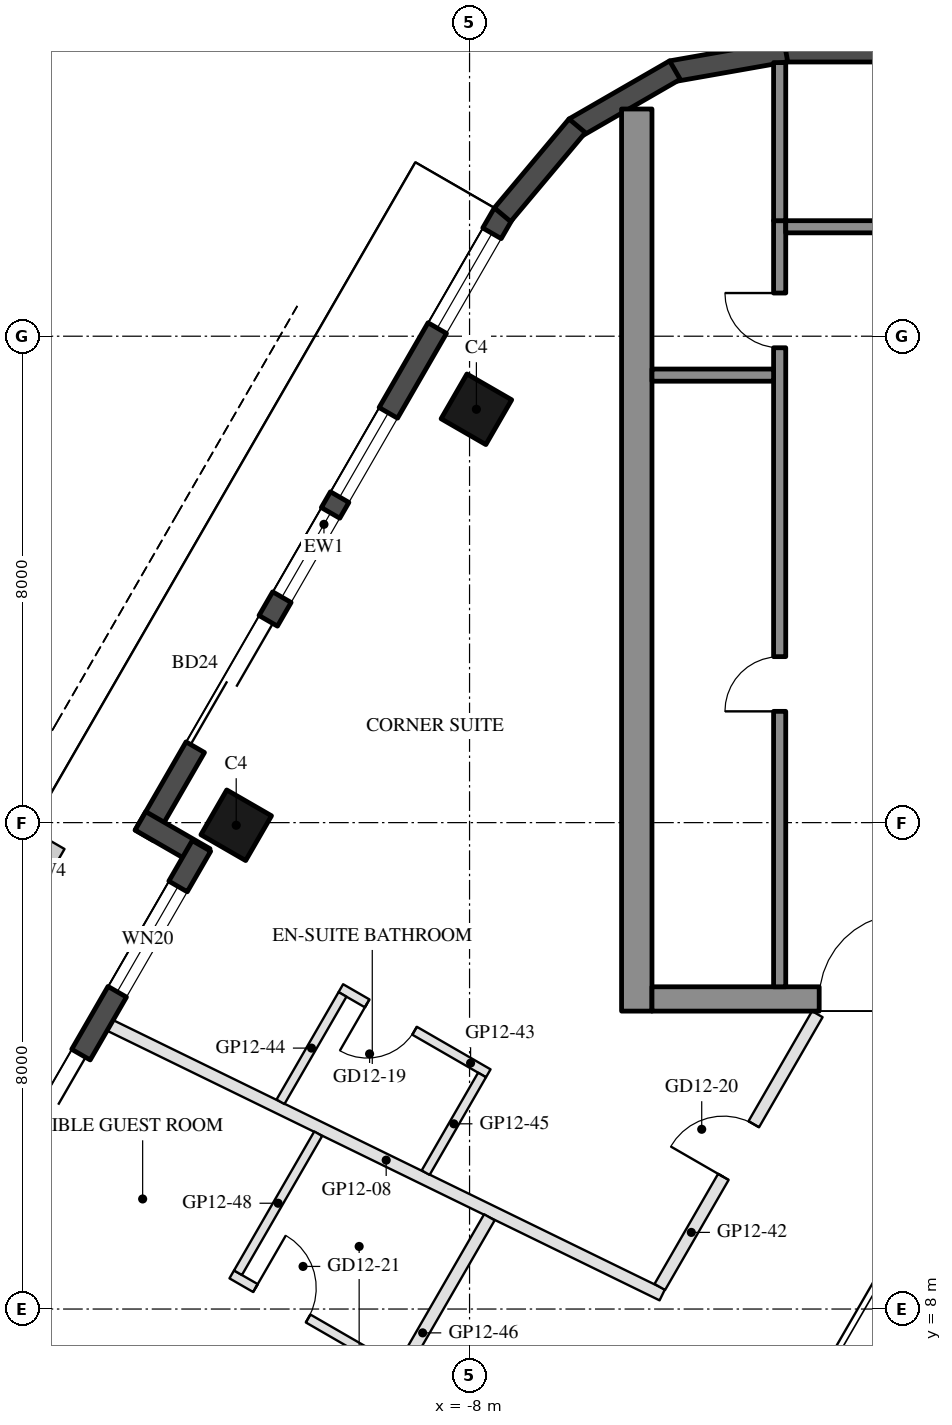
"""IFC4 building model, lengths in metres.
Left out: names, types, materials, properties, quantities, classifications, styles, units other than length and angle.
Written with IfcOpenShell. Run it as: python <this file> out.ifc"""

import sys

from ifc_helpers import new_model, si_unit, direction, frame, frame_2d, origin, origin_2d, place, context, subcontext, project, spatial, rectangle, hollow_rectangle, extrude, element, fill, save


model = new_model("IFC4")
c1 = context("Model", 3, precision=1e-05, world=origin(), true_north=direction((0.0, 1.0)))
c2 = subcontext(c1, "Body", "Model", "MODEL_VIEW")
j1 = project(units=[si_unit("LENGTHUNIT", "METRE"), si_unit("PLANEANGLEUNIT", "RADIAN")], contexts=[c1])
p1 = place(None, origin())
s1 = spatial("IfcSite", under=j1, at=p1, CompositionType="ELEMENT")
p2 = place(p1, origin())
s2 = spatial("IfcBuilding", under=s1, at=p2, CompositionType="ELEMENT")
p3 = place(p2, frame((0.0, 0.0, 150.3)))
s3 = spatial("IfcBuildingStorey", under=s2, at=p3, CompositionType="ELEMENT", Elevation=150.3)
for number, where, z_axis, x_axis in (
    (1, (-7.888, 22.798, 0.0), (0.0, 0.0, 1.0), (0.5, 0.866, 0.0)),
    (2, (-11.838, 15.957, 0.0), (0.0, 0.0, 1.0), (0.5, 0.866, 0.0)),
):
    element("IfcColumn", number, at=place(p3, frame(where, z_axis=z_axis, x_axis=x_axis)), inside=s3, PredefinedType="COLUMN", context=c2, shape_type="SweptSolid", body=[
        extrude(hollow_rectangle(XDim=0.85, YDim=0.85, WallThickness=0.04, at=origin_2d()), origin(), (0.0, 0.0, 1.0), 3.7),
    ])
p4 = place(p3, frame((-7.441, 26.022, 0.0), z_axis=(0.0, 0.0, 1.0), x_axis=(-0.499992533062, -0.86602971478, 0.0)))
e3 = element("IfcWall", 3, at=p4, inside=s3, PredefinedType="SOLIDWALL", context=c2, shape_type="SweptSolid", body=[
    extrude(rectangle(XDim=11.816, YDim=0.35, at=frame_2d((5.908, 0.0))), origin(), (0.0, 0.0, 1.0), 3.55),
])
p5 = place(p4, frame((0.381, 0.0, 0.3)))
e4 = element("IfcOpeningElement", 4, at=p5, cuts=e3, PredefinedType="OPENING", context=c2, shape_type="SweptSolid", body=[
    extrude(rectangle(XDim=1.8, YDim=2.65, at=frame_2d((0.9, 1.325))), frame((0.0, 0.185, 0.0), z_axis=(0.0, -1.0, 0.0), x_axis=(1.0, 0.0, 0.0)), (0.0, 0.0, 1.0), 0.37),
])
p6 = place(p4, frame((7.74, 0.0, 0.0)))
e5 = element("IfcOpeningElement", 5, at=p6, cuts=e3, PredefinedType="OPENING", context=c2, shape_type="SweptSolid", body=[
    extrude(rectangle(XDim=2.4, YDim=2.4, at=frame_2d((1.2, 1.2))), frame((0.0, 0.185, 0.0), z_axis=(0.0, -1.0, 0.0), x_axis=(1.0, 0.0, 0.0)), (0.0, 0.0, 1.0), 0.37),
])
p7 = place(p4, frame((3.791, 0.0, 0.3)))
e6 = element("IfcOpeningElement", 6, at=p7, cuts=e3, PredefinedType="OPENING", context=c2, shape_type="SweptSolid", body=[
    extrude(rectangle(XDim=1.6, YDim=2.65, at=frame_2d((0.8, 1.325))), frame((0.0, 0.185, 0.0), z_axis=(0.0, -1.0, 0.0), x_axis=(1.0, 0.0, 0.0)), (0.0, 0.0, 1.0), 0.37),
])
p8 = place(p4, frame((5.691, 0.0, 0.3)))
e7 = element("IfcOpeningElement", 7, at=p8, cuts=e3, PredefinedType="OPENING", context=c2, shape_type="SweptSolid", body=[
    extrude(rectangle(XDim=1.6, YDim=2.65, at=frame_2d((0.8, 1.325))), frame((0.0, 0.185, 0.0), z_axis=(0.0, -1.0, 0.0), x_axis=(1.0, 0.0, 0.0)), (0.0, 0.0, 1.0), 0.37),
])
p9 = place(p3, frame((-13.413, 16.029, 0.0), z_axis=(0.0, 0.0, 1.0), x_axis=(0.866005645448, -0.500034220881, 0.0)))
e8 = element("IfcWall", 8, at=p9, inside=s3, PredefinedType="SOLIDWALL", context=c2, shape_type="SweptSolid", body=[
    extrude(rectangle(XDim=1.22, YDim=0.35, at=frame_2d((0.61, 0.0))), origin(), (0.0, 0.0, 1.0), 3.55),
])
p10 = place(p3, frame((-12.409, 15.617, 0.0), z_axis=(0.0, 0.0, 1.0), x_axis=(-0.500003597184, -0.866023326939, 0.0)))
e9 = element("IfcWall", 9, at=p10, inside=s3, PredefinedType="SOLIDWALL", context=c2, shape_type="SweptSolid", body=[
    extrude(rectangle(XDim=6.74, YDim=0.35, at=frame_2d((3.37, 0.0))), origin(), (0.0, 0.0, 1.0), 3.55),
])
p11 = place(p10, frame((0.77, 0.0, 0.3)))
e10 = element("IfcOpeningElement", 10, at=p11, cuts=e9, PredefinedType="OPENING", context=c2, shape_type="SweptSolid", body=[
    extrude(rectangle(XDim=2.0, YDim=2.65, at=frame_2d((1.0, 1.325))), frame((0.0, 0.185, 0.0), z_axis=(0.0, -1.0, 0.0), x_axis=(1.0, 0.0, 0.0)), (0.0, 0.0, 1.0), 0.37),
])
p12 = place(p10, frame((3.964, 0.0, 0.0)))
e11 = element("IfcOpeningElement", 11, at=p12, cuts=e9, PredefinedType="OPENING", context=c2, shape_type="SweptSolid", body=[
    extrude(rectangle(XDim=1.8, YDim=2.4, at=frame_2d((0.9, 1.2))), frame((0.0, 0.185, 0.0), z_axis=(0.0, -1.0, 0.0), x_axis=(1.0, 0.0, 0.0)), (0.0, 0.0, 1.0), 0.37),
])
p13 = place(p3, frame((2.829, 28.685, 0.0), z_axis=(0.0, 0.0, 1.0), x_axis=(-1.0, 0.0, 0.0)))
e12 = element("IfcWall", 12, at=p13, inside=s3, PredefinedType="SOLIDWALL", context=c2, shape_type="SweptSolid", body=[
    extrude(rectangle(XDim=5.658, YDim=0.35, at=frame_2d((2.829, 0.0))), origin(), (0.0, 0.0, 1.0), 3.55),
])
for number, where, z_axis, x_axis in (
    (13, (-2.799, 28.688, 0.0), (0.0, 0.0, 1.0), (-0.985, -0.174, 0.0)),
    (14, (-4.623, 28.377, 0.0), (0.0, 0.0, 1.0), (-0.866, -0.5, 0.0)),
):
    element("IfcWall", number, at=place(p3, frame(where, z_axis=z_axis, x_axis=x_axis)), inside=s3, PredefinedType="SOLIDWALL", context=c2, shape_type="SweptSolid", body=[
        extrude(rectangle(XDim=1.91, YDim=0.35, at=frame_2d((0.955, 0.0))), origin(), (0.0, 0.0, 1.0), 3.55),
    ])
p14 = place(p3, frame((-6.23, 27.461, 0.0), z_axis=(0.0, 0.0, 1.0), x_axis=(-0.642808304945, -0.766027077259, 0.0)))
e15 = element("IfcWall", 15, at=p14, inside=s3, PredefinedType="SOLIDWALL", context=c2, shape_type="SweptSolid", body=[
    extrude(rectangle(XDim=1.91, YDim=0.35, at=frame_2d((0.955, 0.0))), origin(), (0.0, 0.0, 1.0), 3.55),
])
p15 = place(p3, frame((-5.25, 12.9, 0.0), z_axis=(0.0, 0.0, 1.0), x_axis=(0.0, 1.0, 0.0)))
e16 = element("IfcWall", 16, at=p15, inside=s3, PredefinedType="SHEAR", context=c2, shape_type="SweptSolid", body=[
    extrude(rectangle(XDim=14.837, YDim=0.5, at=frame_2d((7.418, 0.0))), origin(), (0.0, 0.0, 1.0), 3.5),
])
p16 = place(p3, frame((5.0, 13.1, 0.0), z_axis=(0.0, 0.0, 1.0), x_axis=(-1.0, 0.0, 0.0)))
e17 = element("IfcWall", 17, at=p16, inside=s3, PredefinedType="SHEAR", context=c2, shape_type="SweptSolid", body=[
    extrude(rectangle(XDim=10.0, YDim=0.4, at=frame_2d((5.0, 0.0))), origin(), (0.0, 0.0, 1.0), 3.5),
])
p17 = place(p16, frame((3.55, 0.0, 0.0)))
e18 = element("IfcOpeningElement", 18, at=p17, cuts=e17, PredefinedType="OPENING", context=c2, shape_type="SweptSolid", body=[
    extrude(rectangle(XDim=1.1, YDim=2.1, at=frame_2d((0.55, 1.05))), frame((0.0, 0.21, 0.0), z_axis=(0.0, -1.0, 0.0), x_axis=(1.0, 0.0, 0.0)), (0.0, 0.0, 1.0), 0.42),
])
p18 = place(p16, frame((5.85, 0.0, 0.0)))
e19 = element("IfcOpeningElement", 19, at=p18, cuts=e17, PredefinedType="OPENING", context=c2, shape_type="SweptSolid", body=[
    extrude(rectangle(XDim=1.4, YDim=2.1, at=frame_2d((0.7, 1.05))), frame((0.0, 0.21, 0.0), z_axis=(0.0, -1.0, 0.0), x_axis=(1.0, 0.0, 0.0)), (0.0, 0.0, 1.0), 0.42),
])
p19 = place(p3, frame((-2.9, 13.3, 0.0), z_axis=(0.0, 0.0, 1.0), x_axis=(0.0, 1.0, 0.0)))
e20 = element("IfcWall", 20, at=p19, inside=s3, PredefinedType="SHEAR", context=c2, shape_type="SweptSolid", body=[
    extrude(rectangle(XDim=12.6, YDim=0.2, at=frame_2d((6.3, 0.0))), origin(), (0.0, 0.0, 1.0), 3.5),
])
p20 = place(p19, frame((4.53, 0.0, 0.0)))
e21 = element("IfcOpeningElement", 21, at=p20, cuts=e20, PredefinedType="OPENING", context=c2, shape_type="SweptSolid", body=[
    extrude(rectangle(XDim=0.9, YDim=2.1, at=frame_2d((0.45, 1.05))), frame((0.0, 0.11, 0.0), z_axis=(0.0, -1.0, 0.0), x_axis=(1.0, 0.0, 0.0)), (0.0, 0.0, 1.0), 0.22),
])
p21 = place(p19, frame((10.51, 0.0, 0.0)))
e22 = element("IfcOpeningElement", 22, at=p21, cuts=e20, PredefinedType="OPENING", context=c2, shape_type="SweptSolid", body=[
    extrude(rectangle(XDim=0.9, YDim=2.1, at=frame_2d((0.45, 1.05))), frame((0.0, 0.11, 0.0), z_axis=(0.0, -1.0, 0.0), x_axis=(1.0, 0.0, 0.0)), (0.0, 0.0, 1.0), 0.22),
])
p22 = place(p3, frame((-0.4, 25.8, 0.0), z_axis=(0.0, 0.0, 1.0), x_axis=(-1.0, 0.0, 0.0)))
e23 = element("IfcWall", 23, at=p22, inside=s3, PredefinedType="SHEAR", context=c2, shape_type="SweptSolid", body=[
    extrude(rectangle(XDim=2.4, YDim=0.2, at=frame_2d((1.2, 0.0))), origin(), (0.0, 0.0, 1.0), 3.5),
])
p23 = place(p3, frame((-3.0, 23.36, 0.0), z_axis=(0.0, 0.0, 1.0), x_axis=(-1.0, 0.0, 0.0)))
e24 = element("IfcWall", 24, at=p23, inside=s3, PredefinedType="SHEAR", context=c2, shape_type="SweptSolid", body=[
    extrude(rectangle(XDim=2.0, YDim=0.2, at=frame_2d((1.0, 0.0))), origin(), (0.0, 0.0, 1.0), 3.5),
])
p24 = place(p3, frame((-2.9, 25.9, 0.0), z_axis=(0.0, 0.0, 1.0), x_axis=(0.0, 1.0, 0.0)))
e25 = element("IfcWall", 25, at=p24, inside=s3, PredefinedType="SHEAR", context=c2, shape_type="SweptSolid", body=[
    extrude(rectangle(XDim=2.6, YDim=0.2, at=frame_2d((1.3, 0.0))), origin(), (0.0, 0.0, 1.0), 3.5),
])
p25 = place(p3, frame((-13.911, 12.665, 0.0), z_axis=(0.0, 0.0, 1.0), x_axis=(0.898639294085, -0.438688293811, 0.0)))
e26 = element("IfcWall", 26, at=p25, inside=s3, PredefinedType="PARTITIONING", context=c2, shape_type="SweptSolid", body=[
    extrude(rectangle(XDim=10.104, YDim=0.2, at=frame_2d((5.052, 0.0))), origin(), (0.0, 0.0, 1.0), 2.95),
])
p26 = place(p3, frame((-17.412, 8.402, 0.0), z_axis=(0.0, 0.0, 1.0), x_axis=(0.880917469793, -0.473269913912, 0.0)))
e27 = element("IfcWall", 27, at=p26, inside=s3, PredefinedType="PARTITIONING", context=c2, shape_type="SweptSolid", body=[
    extrude(rectangle(XDim=7.984, YDim=0.2, at=frame_2d((3.992, 0.0))), origin(), (0.0, 0.0, 1.0), 3.06),
])
p27 = place(p3, frame((-4.871, 8.363, 0.0), z_axis=(0.0, 0.0, 1.0), x_axis=(0.500016142392, 0.86601608377, 0.0)))
e28 = element("IfcWall", 28, at=p27, inside=s3, PredefinedType="PARTITIONING", context=c2, shape_type="SweptSolid", body=[
    extrude(rectangle(XDim=5.181, YDim=0.2, at=frame_2d((2.59, 0.0))), origin(), (0.0, 0.0, 1.0), 2.95),
])
p28 = place(p27, frame((2.09, 0.0, 0.0)))
e29 = element("IfcOpeningElement", 29, at=p28, cuts=e28, PredefinedType="OPENING", context=c2, shape_type="SweptSolid", body=[
    extrude(rectangle(XDim=1.0, YDim=2.1, at=frame_2d((0.5, 1.05))), frame((0.0, 0.11, 0.0), z_axis=(0.0, -1.0, 0.0), x_axis=(1.0, 0.0, 0.0)), (0.0, 0.0, 1.0), 0.22),
])
p29 = place(p3, frame((-7.692, 11.877, 0.0), z_axis=(0.0, 0.0, 1.0), x_axis=(-0.866034573852, 0.49998411664, 0.0)))
e30 = element("IfcWall", 30, at=p29, inside=s3, PredefinedType="PARTITIONING", context=c2, shape_type="SweptSolid", body=[
    extrude(rectangle(XDim=2.8, YDim=0.15, at=frame_2d((1.4, 0.0))), origin(), (0.0, 0.0, 1.0), 3.55),
])
p30 = place(p29, frame((1.4, 0.0, 0.0)))
e31 = element("IfcOpeningElement", 31, at=p30, cuts=e30, PredefinedType="OPENING", context=c2, shape_type="SweptSolid", body=[
    extrude(rectangle(XDim=0.9, YDim=2.1, at=frame_2d((0.45, 1.05))), frame((0.0, 0.085, 0.0), z_axis=(0.0, -1.0, 0.0), x_axis=(1.0, 0.0, 0.0)), (0.0, 0.0, 1.0), 0.17),
])
p31 = place(p3, frame((-10.089, 13.175, 0.0), z_axis=(0.0, 0.0, 1.0), x_axis=(-0.499988401207, -0.866032100247, 0.0)))
e32 = element("IfcWall", 32, at=p31, inside=s3, PredefinedType="PARTITIONING", context=c2, shape_type="SweptSolid", body=[
    extrude(rectangle(XDim=2.04, YDim=0.15, at=frame_2d((1.02, 0.0))), origin(), (0.0, 0.0, 1.0), 3.55),
])
p32 = place(p3, frame((-7.794, 11.85, 0.0), z_axis=(0.0, 0.0, 1.0), x_axis=(-0.500003477455, -0.866023396066, 0.0)))
e33 = element("IfcWall", 33, at=p32, inside=s3, PredefinedType="PARTITIONING", context=c2, shape_type="SweptSolid", body=[
    extrude(rectangle(XDim=1.855, YDim=0.15, at=frame_2d((0.927, 0.0))), origin(), (0.0, 0.0, 1.0), 3.55),
])
p33 = place(p3, frame((-10.417, 4.757, 0.0), z_axis=(0.0, 0.0, 1.0), x_axis=(0.50000105825, 0.866024792803, 0.0)))
e34 = element("IfcWall", 34, at=p33, inside=s3, PredefinedType="PARTITIONING", context=c2, shape_type="SweptSolid", body=[
    extrude(rectangle(XDim=5.487, YDim=0.2, at=frame_2d((2.743, 0.0))), origin(), (0.0, 0.0, 1.0), 2.95),
])
p34 = place(p33, frame((1.03, 0.0, 0.0)))
e35 = element("IfcOpeningElement", 35, at=p34, cuts=e34, PredefinedType="OPENING", context=c2, shape_type="SweptSolid", body=[
    extrude(rectangle(XDim=1.0, YDim=2.1, at=frame_2d((0.5, 1.05))), frame((0.0, 0.11, 0.0), z_axis=(0.0, -1.0, 0.0), x_axis=(1.0, 0.0, 0.0)), (0.0, 0.0, 1.0), 0.22),
])
p35 = place(p3, frame((-11.911, 8.57, 0.0), z_axis=(0.0, 0.0, 1.0), x_axis=(0.86600983753, -0.500026960575, 0.0)))
e36 = element("IfcWall", 36, at=p35, inside=s3, PredefinedType="PARTITIONING", context=c2, shape_type="SweptSolid", body=[
    extrude(rectangle(XDim=3.1, YDim=0.15, at=frame_2d((1.55, 0.0))), origin(), (0.0, 0.0, 1.0), 3.55),
])
p36 = place(p35, frame((0.45, 0.0, 0.0)))
e37 = element("IfcOpeningElement", 37, at=p36, cuts=e36, PredefinedType="OPENING", context=c2, shape_type="SweptSolid", body=[
    extrude(rectangle(XDim=1.0, YDim=2.1, at=frame_2d((0.5, 1.05))), frame((0.0, 0.085, 0.0), z_axis=(0.0, -1.0, 0.0), x_axis=(1.0, 0.0, 0.0)), (0.0, 0.0, 1.0), 0.17),
])
p37 = place(p3, frame((-10.489, 10.883, 0.0), z_axis=(0.0, 0.0, 1.0), x_axis=(-0.500018690203, -0.866014612722, 0.0)))
e38 = element("IfcWall", 38, at=p37, inside=s3, PredefinedType="PARTITIONING", context=c2, shape_type="SweptSolid", body=[
    extrude(rectangle(XDim=2.64, YDim=0.15, at=frame_2d((1.32, 0.0))), origin(), (0.0, 0.0, 1.0), 2.95),
])
p38 = place(p5, origin())
e39 = element("IfcWindow", 39, at=p38, inside=s3, PartitioningType="SINGLE_PANEL", PredefinedType="WINDOW", context=c2, shape_type="SweptSolid", body=[
    extrude(rectangle(XDim=1.8, YDim=2.65, at=frame_2d((0.9, 1.325))), frame((0.0, 0.03, 0.0), z_axis=(0.0, -1.0, 0.0), x_axis=(1.0, 0.0, 0.0)), (0.0, 0.0, 1.0), 0.06),
])
fill(e4, e39)
p39 = place(p6, frame((2.4, 0.0, 0.0), z_axis=(0.0, 0.0, 1.0), x_axis=(-1.0, 0.0, 0.0)))
e40 = element("IfcDoor", 40, at=p39, inside=s3, OperationType="SLIDING_TO_LEFT", PredefinedType="DOOR", context=c2, shape_type="SweptSolid", body=[
    extrude(rectangle(XDim=2.4, YDim=2.4, at=frame_2d((1.2, 1.2))), frame((0.0, 0.025, 0.0), z_axis=(0.0, -1.0, 0.0), x_axis=(1.0, 0.0, 0.0)), (0.0, 0.0, 1.0), 0.05),
])
fill(e5, e40)
p40 = place(p7, origin())
e41 = element("IfcWindow", 41, at=p40, inside=s3, PartitioningType="SINGLE_PANEL", PredefinedType="WINDOW", context=c2, shape_type="SweptSolid", body=[
    extrude(rectangle(XDim=1.6, YDim=2.65, at=frame_2d((0.8, 1.325))), frame((0.0, 0.03, 0.0), z_axis=(0.0, -1.0, 0.0), x_axis=(1.0, 0.0, 0.0)), (0.0, 0.0, 1.0), 0.06),
])
fill(e6, e41)
p41 = place(p8, origin())
e42 = element("IfcWindow", 42, at=p41, inside=s3, PartitioningType="SINGLE_PANEL", PredefinedType="WINDOW", context=c2, shape_type="SweptSolid", body=[
    extrude(rectangle(XDim=1.6, YDim=2.65, at=frame_2d((0.8, 1.325))), frame((0.0, 0.03, 0.0), z_axis=(0.0, -1.0, 0.0), x_axis=(1.0, 0.0, 0.0)), (0.0, 0.0, 1.0), 0.06),
])
fill(e7, e42)
p42 = place(p11, origin())
e43 = element("IfcWindow", 43, at=p42, inside=s3, PartitioningType="SINGLE_PANEL", PredefinedType="WINDOW", context=c2, shape_type="SweptSolid", body=[
    extrude(rectangle(XDim=2.0, YDim=2.65, at=frame_2d((1.0, 1.325))), frame((0.0, 0.03, 0.0), z_axis=(0.0, -1.0, 0.0), x_axis=(1.0, 0.0, 0.0)), (0.0, 0.0, 1.0), 0.06),
])
fill(e10, e43)
p43 = place(p12, frame((1.8, 0.0, 0.0), z_axis=(0.0, 0.0, 1.0), x_axis=(-1.0, 0.0, 0.0)))
e44 = element("IfcDoor", 44, at=p43, inside=s3, OperationType="SLIDING_TO_LEFT", PredefinedType="DOOR", context=c2, shape_type="SweptSolid", body=[
    extrude(rectangle(XDim=1.8, YDim=2.4, at=frame_2d((0.9, 1.2))), frame((0.0, 0.025, 0.0), z_axis=(0.0, -1.0, 0.0), x_axis=(1.0, 0.0, 0.0)), (0.0, 0.0, 1.0), 0.05),
])
fill(e11, e44)
p44 = place(p20, origin())
e45 = element("IfcDoor", 45, at=p44, inside=s3, OperationType="SINGLE_SWING_LEFT", PredefinedType="DOOR", context=c2, shape_type="SweptSolid", body=[
    extrude(rectangle(XDim=0.9, YDim=2.1, at=frame_2d((0.45, 1.05))), frame((0.0, 0.025, 0.0), z_axis=(0.0, -1.0, 0.0), x_axis=(1.0, 0.0, 0.0)), (0.0, 0.0, 1.0), 0.05),
])
fill(e21, e45)
p45 = place(p21, origin())
e46 = element("IfcDoor", 46, at=p45, inside=s3, OperationType="SINGLE_SWING_RIGHT", PredefinedType="DOOR", context=c2, shape_type="SweptSolid", body=[
    extrude(rectangle(XDim=0.9, YDim=2.1, at=frame_2d((0.45, 1.05))), frame((0.0, 0.025, 0.0), z_axis=(0.0, -1.0, 0.0), x_axis=(1.0, 0.0, 0.0)), (0.0, 0.0, 1.0), 0.05),
])
fill(e22, e46)
p46 = place(p18, frame((1.4, 0.0, 0.0), z_axis=(0.0, 0.0, 1.0), x_axis=(-1.0, 0.0, 0.0)))
e47 = element("IfcDoor", 47, at=p46, inside=s3, OperationType="DOUBLE_DOOR_SINGLE_SWING", PredefinedType="DOOR", context=c2, shape_type="SweptSolid", body=[
    extrude(rectangle(XDim=1.4, YDim=2.1, at=frame_2d((0.7, 1.05))), frame((0.0, 0.025, 0.0), z_axis=(0.0, -1.0, 0.0), x_axis=(1.0, 0.0, 0.0)), (0.0, 0.0, 1.0), 0.05),
])
fill(e19, e47)
p47 = place(p30, origin())
e48 = element("IfcDoor", 48, at=p47, inside=s3, OperationType="SINGLE_SWING_RIGHT", PredefinedType="DOOR", context=c2, shape_type="SweptSolid", body=[
    extrude(rectangle(XDim=0.9, YDim=2.1, at=frame_2d((0.45, 1.05))), frame((0.0, 0.025, 0.0), z_axis=(0.0, -1.0, 0.0), x_axis=(1.0, 0.0, 0.0)), (0.0, 0.0, 1.0), 0.05),
])
fill(e31, e48)
p48 = place(p28, origin())
e49 = element("IfcDoor", 49, at=p48, inside=s3, OperationType="SINGLE_SWING_LEFT", PredefinedType="DOOR", context=c2, shape_type="SweptSolid", body=[
    extrude(rectangle(XDim=1.0, YDim=2.1, at=frame_2d((0.5, 1.05))), frame((0.0, 0.025, 0.0), z_axis=(0.0, -1.0, 0.0), x_axis=(1.0, 0.0, 0.0)), (0.0, 0.0, 1.0), 0.05),
])
fill(e29, e49)
p49 = place(p36, origin())
e50 = element("IfcDoor", 50, at=p49, inside=s3, OperationType="SINGLE_SWING_LEFT", PredefinedType="DOOR", context=c2, shape_type="SweptSolid", body=[
    extrude(rectangle(XDim=1.0, YDim=2.1, at=frame_2d((0.5, 1.05))), frame((0.0, 0.025, 0.0), z_axis=(0.0, -1.0, 0.0), x_axis=(1.0, 0.0, 0.0)), (0.0, 0.0, 1.0), 0.05),
])
fill(e37, e50)
save(model, sys.argv[1])
